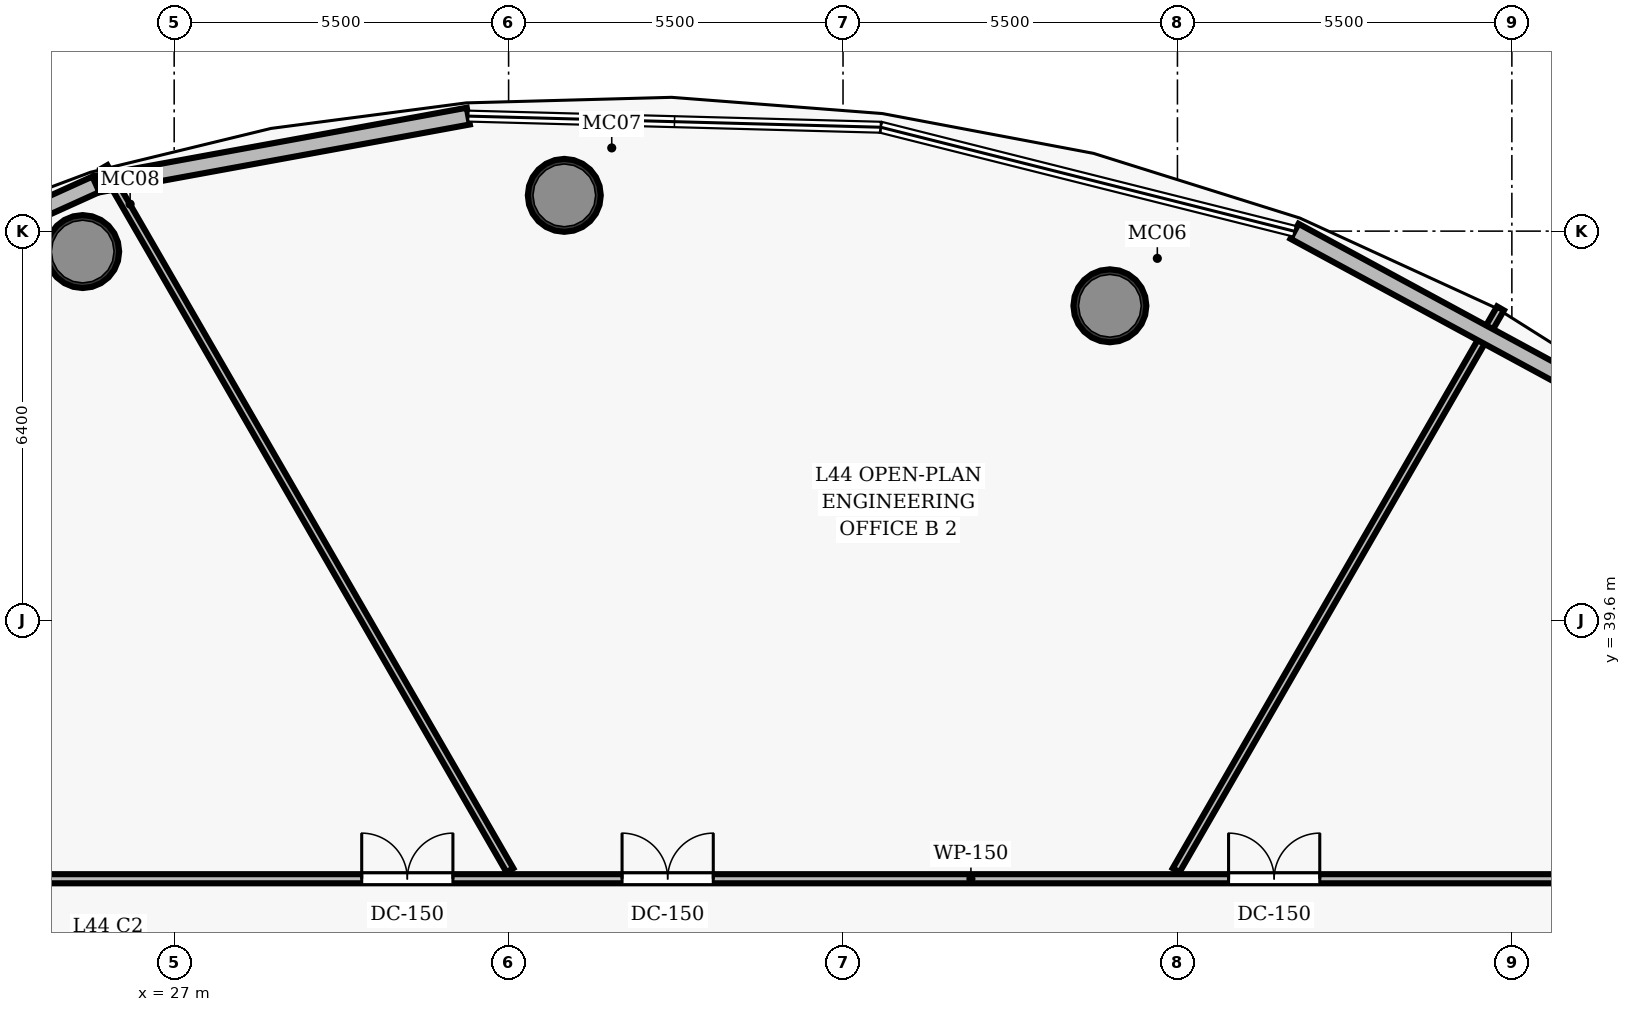
"""IFC4 building model, lengths in metres.
Left out: names, types, materials, properties, quantities, classifications, styles, units other than length and angle.
Written with IfcOpenShell. Run it as: python <this file> out.ifc"""

import sys

from ifc_helpers import new_model, si_unit, direction, frame, frame_2d, origin, origin_2d, place, context, subcontext, project, spatial, rectangle, hollow_circle, extrude, element, fill, save


model = new_model("IFC4")
c1 = context("Model", 3, precision=1e-05, world=origin(), true_north=direction((0.0, 1.0)))
c2 = subcontext(c1, "Body", "Model", "MODEL_VIEW")
j1 = project(units=[si_unit("LENGTHUNIT", "METRE"), si_unit("PLANEANGLEUNIT", "RADIAN")], contexts=[c1])
p1 = place(None, origin())
s1 = spatial("IfcSite", under=j1, at=p1, CompositionType="ELEMENT")
p2 = place(p1, origin())
s2 = spatial("IfcBuilding", under=s1, at=p2, CompositionType="ELEMENT")
p3 = place(p2, frame((0.0, 0.0, 175.05)))
s3 = spatial("IfcBuildingStorey", under=s2, at=p3, CompositionType="ELEMENT", Elevation=175.05)
for number, where, z_axis, x_axis in (
    (1, (42.389, 44.772, 0.0), (0.0, 0.0, 1.0), (1.0, 0.0, 0.0)),
    (2, (33.416, 46.588, 0.0), (0.0, 0.0, 1.0), (1.0, 0.0, 0.0)),
    (3, (25.496, 45.664, 0.0), (0.0, 0.0, 1.0), (1.0, 0.0, 0.0)),
):
    element("IfcColumn", number, at=place(p3, frame(where, z_axis=z_axis, x_axis=x_axis)), inside=s3, PredefinedType="COLUMN", context=c2, shape_type="SweptSolid", body=[
        extrude(hollow_circle(Radius=0.6, WallThickness=0.05, at=origin_2d()), origin(), (0.0, 0.0, 1.0), 3.85),
    ])
p4 = place(p3, frame((24.85, 35.35, 0.0), z_axis=(0.0, 0.0, 1.0), x_axis=(1.0, 0.0, 0.0)))
e4 = element("IfcWall", 4, at=p4, inside=s3, PredefinedType="PARTITIONING", context=c2, shape_type="SweptSolid", body=[
    extrude(rectangle(XDim=26.0, YDim=0.15, at=frame_2d((13.0, 0.0))), origin(), (0.0, 0.0, 1.0), 3.035),
])
p5 = place(p4, frame((19.491, 0.0, 0.0)))
e5 = element("IfcOpeningElement", 5, at=p5, cuts=e4, PredefinedType="OPENING", context=c2, shape_type="SweptSolid", body=[
    extrude(rectangle(XDim=1.5, YDim=2.2, at=frame_2d((0.75, 1.1))), frame((0.0, 0.085, 0.0), z_axis=(0.0, -1.0, 0.0), x_axis=(1.0, 0.0, 0.0)), (0.0, 0.0, 1.0), 0.17),
])
p6 = place(p4, frame((9.516, 0.0, 0.0)))
e6 = element("IfcOpeningElement", 6, at=p6, cuts=e4, PredefinedType="OPENING", context=c2, shape_type="SweptSolid", body=[
    extrude(rectangle(XDim=1.5, YDim=2.2, at=frame_2d((0.75, 1.1))), frame((0.0, 0.085, 0.0), z_axis=(0.0, -1.0, 0.0), x_axis=(1.0, 0.0, 0.0)), (0.0, 0.0, 1.0), 0.17),
])
p7 = place(p4, frame((5.234, 0.0, 0.0)))
e7 = element("IfcOpeningElement", 7, at=p7, cuts=e4, PredefinedType="OPENING", context=c2, shape_type="SweptSolid", body=[
    extrude(rectangle(XDim=1.5, YDim=2.2, at=frame_2d((0.75, 1.1))), frame((0.0, 0.085, 0.0), z_axis=(0.0, -1.0, 0.0), x_axis=(1.0, 0.0, 0.0)), (0.0, 0.0, 1.0), 0.17),
])
p8 = place(p3, frame((43.479, 35.49, 0.0), z_axis=(0.0, 0.0, 1.0), x_axis=(0.499988564899, 0.866032005743, 0.0)))
e8 = element("IfcWall", 8, at=p8, inside=s3, PredefinedType="PARTITIONING", context=c2, shape_type="SweptSolid", body=[
    extrude(rectangle(XDim=10.668, YDim=0.13, at=frame_2d((5.334, 0.0))), origin(), (0.0, 0.0, 1.0), 3.035),
])
p9 = place(p3, frame((32.521, 35.49, 0.0), z_axis=(0.0, 0.0, 1.0), x_axis=(-0.49999788721, 0.866026623601, 0.0)))
e9 = element("IfcWall", 9, at=p9, inside=s3, PredefinedType="PARTITIONING", context=c2, shape_type="SweptSolid", body=[
    extrude(rectangle(XDim=13.351, YDim=0.13, at=frame_2d((6.675, 0.0))), origin(), (0.0, 0.0, 1.0), 3.035),
])
p10 = place(p3, frame((45.425, 45.998, 0.0), z_axis=(0.0, 0.0, 1.0), x_axis=(0.879200648398, -0.476451697295, 0.0)))
e10 = element("IfcWall", 10, at=p10, inside=s3, PredefinedType="SOLIDWALL", context=c2, shape_type="SweptSolid", body=[
    extrude(rectangle(XDim=7.046, YDim=0.28, at=frame_2d((3.523, 0.0))), origin(), (0.0, 0.0, 1.0), 3.62),
])
p11 = place(p3, frame((25.713, 46.77, 0.0), z_axis=(0.0, 0.0, 1.0), x_axis=(0.98364200826, 0.180134393125, 0.0)))
e11 = element("IfcWall", 11, at=p11, inside=s3, PredefinedType="SOLIDWALL", context=c2, shape_type="SweptSolid", body=[
    extrude(rectangle(XDim=6.226, YDim=0.28, at=frame_2d((3.113, 0.0))), origin(), (0.0, 0.0, 1.0), 3.62),
])
p12 = place(p3, frame((20.734, 44.517, 0.0), z_axis=(0.0, 0.0, 1.0), x_axis=(0.911056784124, 0.41228089466, 0.0)))
e12 = element("IfcWall", 12, at=p12, inside=s3, PredefinedType="SOLIDWALL", context=c2, shape_type="SweptSolid", body=[
    extrude(rectangle(XDim=5.465, YDim=0.28, at=frame_2d((2.732, 0.0))), origin(), (0.0, 0.0, 1.0), 3.62),
])
p13 = place(p5, origin())
e13 = element("IfcDoor", 13, at=p13, inside=s3, OperationType="DOUBLE_DOOR_SINGLE_SWING", PredefinedType="DOOR", context=c2, shape_type="SweptSolid", body=[
    extrude(rectangle(XDim=1.5, YDim=2.2, at=frame_2d((0.75, 1.1))), frame((0.0, 0.025, 0.0), z_axis=(0.0, -1.0, 0.0), x_axis=(1.0, 0.0, 0.0)), (0.0, 0.0, 1.0), 0.05),
])
fill(e5, e13)
p14 = place(p6, origin())
e14 = element("IfcDoor", 14, at=p14, inside=s3, OperationType="DOUBLE_DOOR_SINGLE_SWING", PredefinedType="DOOR", context=c2, shape_type="SweptSolid", body=[
    extrude(rectangle(XDim=1.5, YDim=2.2, at=frame_2d((0.75, 1.1))), frame((0.0, 0.025, 0.0), z_axis=(0.0, -1.0, 0.0), x_axis=(1.0, 0.0, 0.0)), (0.0, 0.0, 1.0), 0.05),
])
fill(e6, e14)
p15 = place(p7, origin())
e15 = element("IfcDoor", 15, at=p15, inside=s3, OperationType="DOUBLE_DOOR_SINGLE_SWING", PredefinedType="DOOR", context=c2, shape_type="SweptSolid", body=[
    extrude(rectangle(XDim=1.5, YDim=2.2, at=frame_2d((0.75, 1.1))), frame((0.0, 0.025, 0.0), z_axis=(0.0, -1.0, 0.0), x_axis=(1.0, 0.0, 0.0)), (0.0, 0.0, 1.0), 0.05),
])
fill(e7, e15)
save(model, sys.argv[1])
